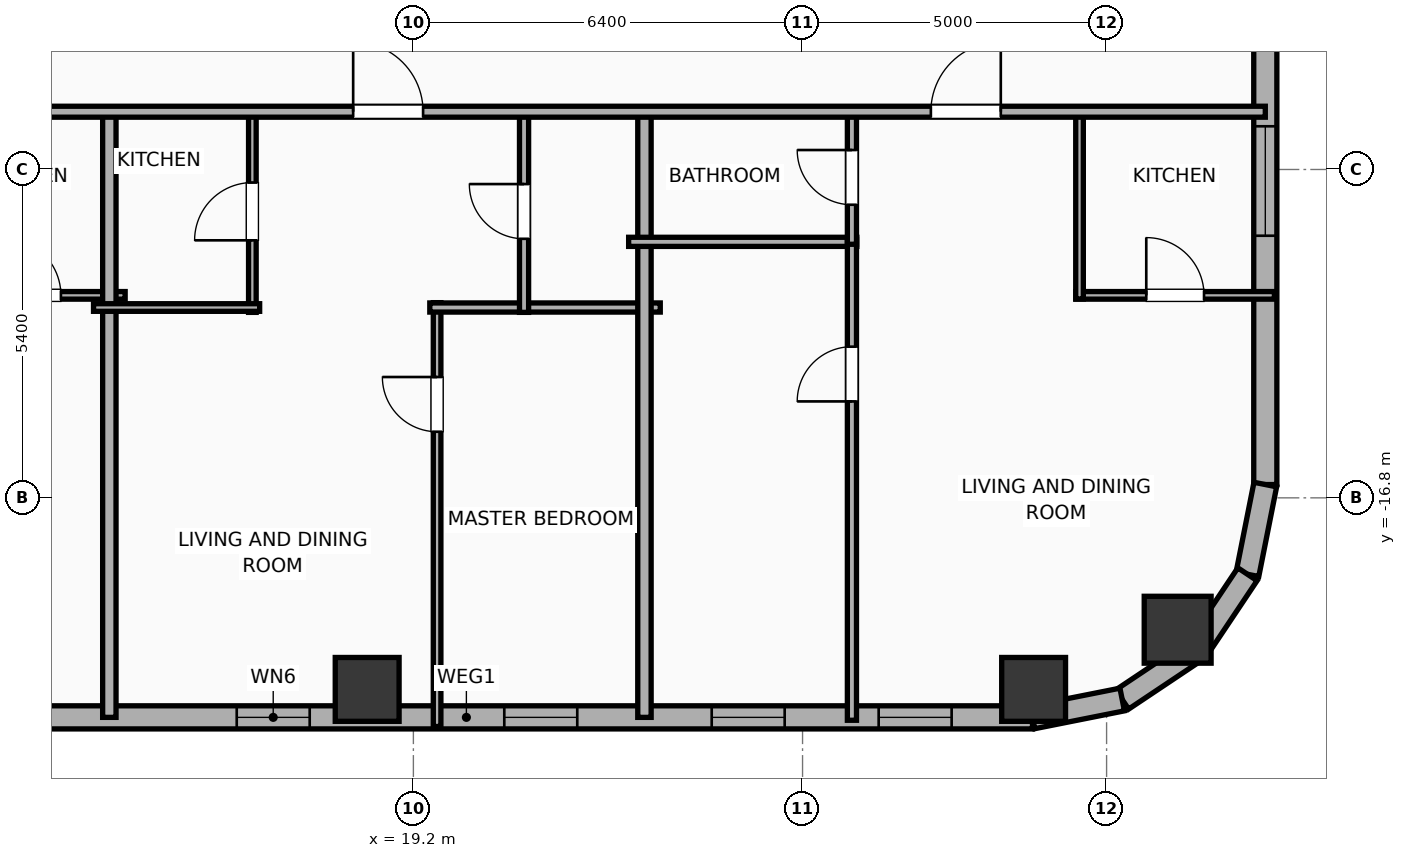
"""IFC4 building model, lengths in metres.
Left out: names, types, materials, properties, quantities, classifications, styles, units other than length and angle.
Written with IfcOpenShell. Run it as: python <this file> out.ifc"""

import sys

from ifc_helpers import new_model, si_unit, direction, frame, frame_2d, origin, origin_2d, place, context, subcontext, project, spatial, rectangle, hollow_rectangle, hollow_circle, extrude, element, fill, save


model = new_model("IFC4")
c1 = context("Model", 3, precision=1e-05, world=origin(), true_north=direction((0.0, 1.0)))
c2 = subcontext(c1, "Body", "Model", "MODEL_VIEW")
j1 = project(units=[si_unit("LENGTHUNIT", "METRE"), si_unit("PLANEANGLEUNIT", "RADIAN")], contexts=[c1])
p1 = place(None, origin())
s1 = spatial("IfcSite", under=j1, at=p1, CompositionType="ELEMENT")
p2 = place(p1, origin())
s2 = spatial("IfcBuilding", under=s1, at=p2, CompositionType="ELEMENT")
p3 = place(p2, frame((0.0, 0.0, 117.0)))
s3 = spatial("IfcBuildingStorey", under=s2, at=p3, CompositionType="ELEMENT", Elevation=117.0)
for number, where, z_axis, x_axis in (
    (1, (18.44, -19.95, 0.0), (0.0, 0.0, 1.0), (1.0, 0.0, 0.0)),
    (2, (29.4, -19.95, 0.0), (0.0, 0.0, 1.0), (1.0, 0.0, 0.0)),
):
    element("IfcColumn", number, at=place(p3, frame(where, z_axis=z_axis, x_axis=x_axis)), inside=s3, PredefinedType="COLUMN", context=c2, shape_type="SweptSolid", body=[
        extrude(hollow_rectangle(XDim=1.05, YDim=1.05, WallThickness=0.036, at=origin_2d()), origin(), (0.0, 0.0, 1.0), 3.9),
    ])
p4 = place(p3, frame((31.769, -18.969, 0.0), z_axis=(0.0, 0.0, 1.0), x_axis=(1.0, 0.0, 0.0)))
e3 = element("IfcColumn", 3, at=p4, inside=s3, PredefinedType="COLUMN", context=c2, shape_type="SweptSolid", body=[
    extrude(hollow_circle(Radius=0.55, WallThickness=0.036, at=origin_2d()), origin(), (0.0, 0.0, 1.0), 3.9),
])
p5 = place(p3, frame((29.381, -20.41, 0.0), z_axis=(0.0, 0.0, 1.0), x_axis=(-1.0, 0.0, 0.0)))
e4 = element("IfcWall", 4, at=p5, inside=s3, PredefinedType="ELEMENTEDWALL", context=c2, shape_type="SweptSolid", body=[
    extrude(rectangle(XDim=18.619, YDim=0.38, at=frame_2d((9.31, 0.0))), origin(), (0.0, 0.0, 1.0), 3.65),
])
p6 = place(p5, frame((11.886, 0.0, 0.75)))
e5 = element("IfcOpeningElement", 5, at=p6, cuts=e4, PredefinedType="OPENING", context=c2, shape_type="SweptSolid", body=[
    extrude(rectangle(XDim=1.2, YDim=2.05, at=frame_2d((0.6, 1.025))), frame((0.0, 0.2, 0.0), z_axis=(0.0, -1.0, 0.0), x_axis=(1.0, 0.0, 0.0)), (0.0, 0.0, 1.0), 0.4),
])
p7 = place(p5, frame((7.486, 0.0, 0.75)))
e6 = element("IfcOpeningElement", 6, at=p7, cuts=e4, PredefinedType="OPENING", context=c2, shape_type="SweptSolid", body=[
    extrude(rectangle(XDim=1.2, YDim=2.05, at=frame_2d((0.6, 1.025))), frame((0.0, 0.2, 0.0), z_axis=(0.0, -1.0, 0.0), x_axis=(1.0, 0.0, 0.0)), (0.0, 0.0, 1.0), 0.4),
])
p8 = place(p5, frame((4.075, 0.0, 0.75)))
e7 = element("IfcOpeningElement", 7, at=p8, cuts=e4, PredefinedType="OPENING", context=c2, shape_type="SweptSolid", body=[
    extrude(rectangle(XDim=1.2, YDim=2.05, at=frame_2d((0.6, 1.025))), frame((0.0, 0.2, 0.0), z_axis=(0.0, -1.0, 0.0), x_axis=(1.0, 0.0, 0.0)), (0.0, 0.0, 1.0), 0.4),
])
p9 = place(p5, frame((1.33, 0.0, 0.75)))
e8 = element("IfcOpeningElement", 8, at=p9, cuts=e4, PredefinedType="OPENING", context=c2, shape_type="SweptSolid", body=[
    extrude(rectangle(XDim=1.2, YDim=2.05, at=frame_2d((0.6, 1.025))), frame((0.0, 0.2, 0.0), z_axis=(0.0, -1.0, 0.0), x_axis=(1.0, 0.0, 0.0)), (0.0, 0.0, 1.0), 0.4),
])
p10 = place(p3, frame((33.21, -4.898, 0.0), z_axis=(0.0, 0.0, 1.0), x_axis=(0.0, -1.0, 0.0)))
e9 = element("IfcWall", 9, at=p10, inside=s3, PredefinedType="ELEMENTEDWALL", context=c2, shape_type="SweptSolid", body=[
    extrude(rectangle(XDim=11.683, YDim=0.38, at=frame_2d((5.842, 0.0))), origin(), (0.0, 0.0, 1.0), 3.65),
])
p11 = place(p10, frame((5.792, 0.0, 0.75)))
e10 = element("IfcOpeningElement", 10, at=p11, cuts=e9, PredefinedType="OPENING", context=c2, shape_type="SweptSolid", body=[
    extrude(rectangle(XDim=1.8, YDim=2.1, at=frame_2d((0.9, 1.05))), frame((0.0, 0.2, 0.0), z_axis=(0.0, -1.0, 0.0), x_axis=(1.0, 0.0, 0.0)), (0.0, 0.0, 1.0), 0.4),
])
p12 = place(p3, frame((33.21, -16.581, 0.0), z_axis=(0.0, 0.0, 1.0), x_axis=(-0.195086038585, -0.980786132421, 0.0)))
e11 = element("IfcWall", 11, at=p12, inside=s3, PredefinedType="ELEMENTEDWALL", context=c2, shape_type="SweptSolid", body=[
    extrude(rectangle(XDim=1.504, YDim=0.38, at=frame_2d((0.752, 0.0))), origin(), (0.0, 0.0, 1.0), 3.65),
])
p13 = place(p3, frame((32.917, -18.057, 0.0), z_axis=(0.0, 0.0, 1.0), x_axis=(-0.555610286119, -0.831442848281, 0.0)))
e12 = element("IfcWall", 12, at=p13, inside=s3, PredefinedType="ELEMENTEDWALL", context=c2, shape_type="SweptSolid", body=[
    extrude(rectangle(XDim=1.485, YDim=0.38, at=frame_2d((0.743, 0.0))), origin(), (0.0, 0.0, 1.0), 3.65),
])
p14 = place(p3, frame((32.091, -19.292, 0.0), z_axis=(0.0, 0.0, 1.0), x_axis=(-0.831468045563, -0.555572577804, 0.0)))
e13 = element("IfcWall", 13, at=p14, inside=s3, PredefinedType="ELEMENTEDWALL", context=c2, shape_type="SweptSolid", body=[
    extrude(rectangle(XDim=1.485, YDim=0.38, at=frame_2d((0.742, 0.0))), origin(), (0.0, 0.0, 1.0), 3.65),
])
p15 = place(p3, frame((30.857, -20.116, 0.0), z_axis=(0.0, 0.0, 1.0), x_axis=(-0.980786132421, -0.195086038585, 0.0)))
e14 = element("IfcWall", 14, at=p15, inside=s3, PredefinedType="ELEMENTEDWALL", context=c2, shape_type="SweptSolid", body=[
    extrude(rectangle(XDim=1.504, YDim=0.38, at=frame_2d((0.752, 0.0))), origin(), (0.0, 0.0, 1.0), 3.65),
])
p16 = place(p3, frame((11.397, -13.47, 0.0), z_axis=(0.0, 0.0, 1.0), x_axis=(1.0, 0.0, 0.0)))
e15 = element("IfcWall", 15, at=p16, inside=s3, PredefinedType="PARTITIONING", context=c2, shape_type="SweptSolid", body=[
    extrude(rectangle(XDim=3.063, YDim=0.125, at=frame_2d((1.531, 0.0))), origin(), (0.0, 0.0, 1.0), 3.65),
])
p17 = place(p16, frame((1.056, 0.0, 0.0)))
e16 = element("IfcOpeningElement", 16, at=p17, cuts=e15, PredefinedType="OPENING", context=c2, shape_type="SweptSolid", body=[
    extrude(rectangle(XDim=0.95, YDim=2.05, at=frame_2d((0.475, 1.025))), frame((0.0, 0.073, 0.0), z_axis=(0.0, -1.0, 0.0), x_axis=(1.0, 0.0, 0.0)), (0.0, 0.0, 1.0), 0.145),
])
p18 = place(p3, frame((14.2, -20.41, 0.0), z_axis=(0.0, 0.0, 1.0), x_axis=(0.0, 1.0, 0.0)))
e17 = element("IfcWall", 17, at=p18, inside=s3, PredefinedType="PARTITIONING", context=c2, shape_type="SweptSolid", body=[
    extrude(rectangle(XDim=10.04, YDim=0.22, at=frame_2d((5.02, 0.0))), origin(), (0.0, 0.0, 1.0), 3.65),
])
p19 = place(p3, frame((19.59, -20.56, 0.0), z_axis=(0.0, 0.0, 1.0), x_axis=(0.0, 1.0, 0.0)))
e18 = element("IfcWall", 18, at=p19, inside=s3, PredefinedType="PARTITIONING", context=c2, shape_type="SweptSolid", body=[
    extrude(rectangle(XDim=6.97, YDim=0.125, at=frame_2d((3.485, 0.0))), origin(), (0.0, 0.0, 1.0), 3.65),
])
p20 = place(p19, frame((4.847, 0.0, 0.0)))
e19 = element("IfcOpeningElement", 19, at=p20, cuts=e18, PredefinedType="OPENING", context=c2, shape_type="SweptSolid", body=[
    extrude(rectangle(XDim=0.9, YDim=2.05, at=frame_2d((0.45, 1.025))), frame((0.0, 0.073, 0.0), z_axis=(0.0, -1.0, 0.0), x_axis=(1.0, 0.0, 0.0)), (0.0, 0.0, 1.0), 0.145),
])
p21 = place(p3, frame((19.47, -13.67, 0.0), z_axis=(0.0, 0.0, 1.0), x_axis=(1.0, 0.0, 0.0)))
e20 = element("IfcWall", 20, at=p21, inside=s3, PredefinedType="PLUMBINGWALL", context=c2, shape_type="SweptSolid", body=[
    extrude(rectangle(XDim=3.79, YDim=0.15, at=frame_2d((1.895, 0.0))), origin(), (0.0, 0.0, 1.0), 3.65),
])
p22 = place(p3, frame((16.552, -13.75, 0.0), z_axis=(0.0, 0.0, 1.0), x_axis=(0.0, 1.0, 0.0)))
e21 = element("IfcWall", 21, at=p22, inside=s3, PredefinedType="PARTITIONING", context=c2, shape_type="SweptSolid", body=[
    extrude(rectangle(XDim=3.32, YDim=0.125, at=frame_2d((1.66, 0.0))), origin(), (0.0, 0.0, 1.0), 3.65),
])
p23 = place(p22, frame((1.185, 0.0, 0.0)))
e22 = element("IfcOpeningElement", 22, at=p23, cuts=e21, PredefinedType="OPENING", context=c2, shape_type="SweptSolid", body=[
    extrude(rectangle(XDim=0.95, YDim=2.05, at=frame_2d((0.475, 1.025))), frame((0.0, 0.073, 0.0), z_axis=(0.0, -1.0, 0.0), x_axis=(1.0, 0.0, 0.0)), (0.0, 0.0, 1.0), 0.145),
])
p24 = place(p3, frame((13.94, -13.67, 0.0), z_axis=(0.0, 0.0, 1.0), x_axis=(1.0, 0.0, 0.0)))
e23 = element("IfcWall", 23, at=p24, inside=s3, PredefinedType="PARTITIONING", context=c2, shape_type="SweptSolid", body=[
    extrude(rectangle(XDim=2.732, YDim=0.125, at=frame_2d((1.366, 0.0))), origin(), (0.0, 0.0, 1.0), 3.65),
])
p25 = place(p3, frame((21.02, -13.75, 0.0), z_axis=(0.0, 0.0, 1.0), x_axis=(0.0, 1.0, 0.0)))
e24 = element("IfcWall", 24, at=p25, inside=s3, PredefinedType="PLUMBINGWALL", context=c2, shape_type="SweptSolid", body=[
    extrude(rectangle(XDim=3.32, YDim=0.15, at=frame_2d((1.66, 0.0))), origin(), (0.0, 0.0, 1.0), 3.65),
])
p26 = place(p25, frame((1.21, 0.0, 0.0)))
e25 = element("IfcOpeningElement", 25, at=p26, cuts=e24, PredefinedType="OPENING", context=c2, shape_type="SweptSolid", body=[
    extrude(rectangle(XDim=0.9, YDim=2.05, at=frame_2d((0.45, 1.025))), frame((0.0, 0.085, 0.0), z_axis=(0.0, -1.0, 0.0), x_axis=(1.0, 0.0, 0.0)), (0.0, 0.0, 1.0), 0.17),
])
p27 = place(p3, frame((23.0, -20.41, 0.0), z_axis=(0.0, 0.0, 1.0), x_axis=(0.0, 1.0, 0.0)))
e26 = element("IfcWall", 26, at=p27, inside=s3, PredefinedType="PARTITIONING", context=c2, shape_type="SweptSolid", body=[
    extrude(rectangle(XDim=10.04, YDim=0.22, at=frame_2d((5.02, 0.0))), origin(), (0.0, 0.0, 1.0), 3.65),
])
p28 = place(p3, frame((22.74, -12.59, 0.0), z_axis=(0.0, 0.0, 1.0), x_axis=(1.0, 0.0, 0.0)))
e27 = element("IfcWall", 27, at=p28, inside=s3, PredefinedType="PLUMBINGWALL", context=c2, shape_type="SweptSolid", body=[
    extrude(rectangle(XDim=3.752, YDim=0.15, at=frame_2d((1.876, 0.0))), origin(), (0.0, 0.0, 1.0), 3.65),
])
p29 = place(p3, frame((26.412, -20.458, 0.0), z_axis=(0.0, 0.0, 1.0), x_axis=(0.0, 1.0, 0.0)))
e28 = element("IfcWall", 28, at=p29, inside=s3, PredefinedType="PLUMBINGWALL", context=c2, shape_type="SweptSolid", body=[
    extrude(rectangle(XDim=7.907, YDim=0.15, at=frame_2d((3.954, 0.0))), origin(), (0.0, 0.0, 1.0), 3.65),
])
p30 = place(p29, frame((5.243, 0.0, 0.0)))
e29 = element("IfcOpeningElement", 29, at=p30, cuts=e28, PredefinedType="OPENING", context=c2, shape_type="SweptSolid", body=[
    extrude(rectangle(XDim=0.9, YDim=2.05, at=frame_2d((0.45, 1.025))), frame((0.0, 0.085, 0.0), z_axis=(0.0, -1.0, 0.0), x_axis=(1.0, 0.0, 0.0)), (0.0, 0.0, 1.0), 0.17),
])
p31 = place(p3, frame((26.412, -12.63, 0.0), z_axis=(0.0, 0.0, 1.0), x_axis=(0.0, 1.0, 0.0)))
e30 = element("IfcWall", 30, at=p31, inside=s3, PredefinedType="PLUMBINGWALL", context=c2, shape_type="SweptSolid", body=[
    extrude(rectangle(XDim=2.2, YDim=0.15, at=frame_2d((1.1, 0.0))), origin(), (0.0, 0.0, 1.0), 3.65),
])
p32 = place(p31, frame((0.65, 0.0, 0.0)))
e31 = element("IfcOpeningElement", 31, at=p32, cuts=e30, PredefinedType="OPENING", context=c2, shape_type="SweptSolid", body=[
    extrude(rectangle(XDim=0.9, YDim=2.05, at=frame_2d((0.45, 1.025))), frame((0.0, 0.085, 0.0), z_axis=(0.0, -1.0, 0.0), x_axis=(1.0, 0.0, 0.0)), (0.0, 0.0, 1.0), 0.17),
])
p33 = place(p3, frame((30.095, -13.47, 0.0), z_axis=(0.0, 0.0, 1.0), x_axis=(1.0, 0.0, 0.0)))
e32 = element("IfcWall", 32, at=p33, inside=s3, PredefinedType="PARTITIONING", context=c2, shape_type="SweptSolid", body=[
    extrude(rectangle(XDim=3.265, YDim=0.125, at=frame_2d((1.633, 0.0))), origin(), (0.0, 0.0, 1.0), 3.65),
])
p34 = place(p33, frame((1.157, 0.0, 0.0)))
e33 = element("IfcOpeningElement", 33, at=p34, cuts=e32, PredefinedType="OPENING", context=c2, shape_type="SweptSolid", body=[
    extrude(rectangle(XDim=0.95, YDim=2.05, at=frame_2d((0.475, 1.025))), frame((0.0, 0.073, 0.0), z_axis=(0.0, -1.0, 0.0), x_axis=(1.0, 0.0, 0.0)), (0.0, 0.0, 1.0), 0.145),
])
p35 = place(p3, frame((30.155, -13.53, 0.0), z_axis=(0.0, 0.0, 1.0), x_axis=(0.0, 1.0, 0.0)))
e34 = element("IfcWall", 34, at=p35, inside=s3, PredefinedType="PARTITIONING", context=c2, shape_type="SweptSolid", body=[
    extrude(rectangle(XDim=3.1, YDim=0.125, at=frame_2d((1.55, 0.0))), origin(), (0.0, 0.0, 1.0), 3.65),
])
p36 = place(p3, frame((-29.21, -10.45, 0.0), z_axis=(0.0, 0.0, 1.0), x_axis=(1.0, 0.0, 0.0)))
e35 = element("IfcWall", 35, at=p36, inside=s3, PredefinedType="PARTITIONING", context=c2, shape_type="SweptSolid", body=[
    extrude(rectangle(XDim=62.42, YDim=0.18, at=frame_2d((31.21, 0.0))), origin(), (0.0, 0.0, 1.0), 3.65),
])
p37 = place(p36, frame((3.813, 0.0, 0.0)))
e36 = element("IfcOpeningElement", 36, at=p37, cuts=e35, PredefinedType="OPENING", context=c2, shape_type="SweptSolid", body=[
    extrude(rectangle(XDim=1.15, YDim=2.05, at=frame_2d((0.575, 1.025))), frame((0.0, 0.1, 0.0), z_axis=(0.0, -1.0, 0.0), x_axis=(1.0, 0.0, 0.0)), (0.0, 0.0, 1.0), 0.2),
])
p38 = place(p36, frame((12.271, 0.0, 0.0)))
e37 = element("IfcOpeningElement", 37, at=p38, cuts=e35, PredefinedType="OPENING", context=c2, shape_type="SweptSolid", body=[
    extrude(rectangle(XDim=1.15, YDim=2.05, at=frame_2d((0.575, 1.025))), frame((0.0, 0.1, 0.0), z_axis=(0.0, -1.0, 0.0), x_axis=(1.0, 0.0, 0.0)), (0.0, 0.0, 1.0), 0.2),
])
p39 = place(p36, frame((20.804, 0.0, 0.0)))
e38 = element("IfcOpeningElement", 38, at=p39, cuts=e35, PredefinedType="OPENING", context=c2, shape_type="SweptSolid", body=[
    extrude(rectangle(XDim=1.15, YDim=2.05, at=frame_2d((0.575, 1.025))), frame((0.0, 0.1, 0.0), z_axis=(0.0, -1.0, 0.0), x_axis=(1.0, 0.0, 0.0)), (0.0, 0.0, 1.0), 0.2),
])
p40 = place(p36, frame((29.848, 0.0, 0.0)))
e39 = element("IfcOpeningElement", 39, at=p40, cuts=e35, PredefinedType="OPENING", context=c2, shape_type="SweptSolid", body=[
    extrude(rectangle(XDim=1.15, YDim=2.05, at=frame_2d((0.575, 1.025))), frame((0.0, 0.1, 0.0), z_axis=(0.0, -1.0, 0.0), x_axis=(1.0, 0.0, 0.0)), (0.0, 0.0, 1.0), 0.2),
])
p41 = place(p36, frame((38.45, 0.0, 0.0)))
e40 = element("IfcOpeningElement", 40, at=p41, cuts=e35, PredefinedType="OPENING", context=c2, shape_type="SweptSolid", body=[
    extrude(rectangle(XDim=1.15, YDim=2.05, at=frame_2d((0.575, 1.025))), frame((0.0, 0.1, 0.0), z_axis=(0.0, -1.0, 0.0), x_axis=(1.0, 0.0, 0.0)), (0.0, 0.0, 1.0), 0.2),
])
p42 = place(p36, frame((47.42, 0.0, 0.0)))
e41 = element("IfcOpeningElement", 41, at=p42, cuts=e35, PredefinedType="OPENING", context=c2, shape_type="SweptSolid", body=[
    extrude(rectangle(XDim=1.15, YDim=2.05, at=frame_2d((0.575, 1.025))), frame((0.0, 0.1, 0.0), z_axis=(0.0, -1.0, 0.0), x_axis=(1.0, 0.0, 0.0)), (0.0, 0.0, 1.0), 0.2),
])
p43 = place(p36, frame((56.92, 0.0, 0.0)))
e42 = element("IfcOpeningElement", 42, at=p43, cuts=e35, PredefinedType="OPENING", context=c2, shape_type="SweptSolid", body=[
    extrude(rectangle(XDim=1.15, YDim=2.05, at=frame_2d((0.575, 1.025))), frame((0.0, 0.1, 0.0), z_axis=(0.0, -1.0, 0.0), x_axis=(1.0, 0.0, 0.0)), (0.0, 0.0, 1.0), 0.2),
])
p44 = place(p11, origin())
e43 = element("IfcWindow", 43, at=p44, inside=s3, PartitioningType="SINGLE_PANEL", PredefinedType="WINDOW", context=c2, shape_type="SweptSolid", body=[
    extrude(rectangle(XDim=1.8, YDim=2.1, at=frame_2d((0.9, 1.05))), frame((0.0, 0.03, 0.0), z_axis=(0.0, -1.0, 0.0), x_axis=(1.0, 0.0, 0.0)), (0.0, 0.0, 1.0), 0.06),
])
fill(e10, e43)
p45 = place(p6, origin())
e44 = element("IfcWindow", 44, at=p45, inside=s3, PartitioningType="SINGLE_PANEL", PredefinedType="WINDOW", context=c2, shape_type="SweptSolid", body=[
    extrude(rectangle(XDim=1.2, YDim=2.05, at=frame_2d((0.6, 1.025))), frame((0.0, 0.03, 0.0), z_axis=(0.0, -1.0, 0.0), x_axis=(1.0, 0.0, 0.0)), (0.0, 0.0, 1.0), 0.06),
])
fill(e5, e44)
p46 = place(p7, origin())
e45 = element("IfcWindow", 45, at=p46, inside=s3, PartitioningType="SINGLE_PANEL", PredefinedType="WINDOW", context=c2, shape_type="SweptSolid", body=[
    extrude(rectangle(XDim=1.2, YDim=2.05, at=frame_2d((0.6, 1.025))), frame((0.0, 0.03, 0.0), z_axis=(0.0, -1.0, 0.0), x_axis=(1.0, 0.0, 0.0)), (0.0, 0.0, 1.0), 0.06),
])
fill(e6, e45)
p47 = place(p8, origin())
e46 = element("IfcWindow", 46, at=p47, inside=s3, PartitioningType="SINGLE_PANEL", PredefinedType="WINDOW", context=c2, shape_type="SweptSolid", body=[
    extrude(rectangle(XDim=1.2, YDim=2.05, at=frame_2d((0.6, 1.025))), frame((0.0, 0.03, 0.0), z_axis=(0.0, -1.0, 0.0), x_axis=(1.0, 0.0, 0.0)), (0.0, 0.0, 1.0), 0.06),
])
fill(e7, e46)
p48 = place(p9, origin())
e47 = element("IfcWindow", 47, at=p48, inside=s3, PartitioningType="SINGLE_PANEL", PredefinedType="WINDOW", context=c2, shape_type="SweptSolid", body=[
    extrude(rectangle(XDim=1.2, YDim=2.05, at=frame_2d((0.6, 1.025))), frame((0.0, 0.03, 0.0), z_axis=(0.0, -1.0, 0.0), x_axis=(1.0, 0.0, 0.0)), (0.0, 0.0, 1.0), 0.06),
])
fill(e8, e47)
p49 = place(p17, origin())
e48 = element("IfcDoor", 48, at=p49, inside=s3, OperationType="SINGLE_SWING_LEFT", PredefinedType="DOOR", context=c2, shape_type="SweptSolid", body=[
    extrude(rectangle(XDim=0.95, YDim=2.05, at=frame_2d((0.475, 1.025))), frame((0.0, 0.025, 0.0), z_axis=(0.0, -1.0, 0.0), x_axis=(1.0, 0.0, 0.0)), (0.0, 0.0, 1.0), 0.05),
])
fill(e16, e48)
p50 = place(p20, origin())
e49 = element("IfcDoor", 49, at=p50, inside=s3, OperationType="SINGLE_SWING_RIGHT", PredefinedType="DOOR", context=c2, shape_type="SweptSolid", body=[
    extrude(rectangle(XDim=0.9, YDim=2.05, at=frame_2d((0.45, 1.025))), frame((0.0, 0.025, 0.0), z_axis=(0.0, -1.0, 0.0), x_axis=(1.0, 0.0, 0.0)), (0.0, 0.0, 1.0), 0.05),
])
fill(e19, e49)
p51 = place(p23, origin())
e50 = element("IfcDoor", 50, at=p51, inside=s3, OperationType="SINGLE_SWING_LEFT", PredefinedType="DOOR", context=c2, shape_type="SweptSolid", body=[
    extrude(rectangle(XDim=0.95, YDim=2.05, at=frame_2d((0.475, 1.025))), frame((0.0, 0.025, 0.0), z_axis=(0.0, -1.0, 0.0), x_axis=(1.0, 0.0, 0.0)), (0.0, 0.0, 1.0), 0.05),
])
fill(e22, e50)
p52 = place(p26, origin())
e51 = element("IfcDoor", 51, at=p52, inside=s3, OperationType="SINGLE_SWING_RIGHT", PredefinedType="DOOR", context=c2, shape_type="SweptSolid", body=[
    extrude(rectangle(XDim=0.9, YDim=2.05, at=frame_2d((0.45, 1.025))), frame((0.0, 0.025, 0.0), z_axis=(0.0, -1.0, 0.0), x_axis=(1.0, 0.0, 0.0)), (0.0, 0.0, 1.0), 0.05),
])
fill(e25, e51)
p53 = place(p30, origin())
e52 = element("IfcDoor", 52, at=p53, inside=s3, OperationType="SINGLE_SWING_LEFT", PredefinedType="DOOR", context=c2, shape_type="SweptSolid", body=[
    extrude(rectangle(XDim=0.9, YDim=2.05, at=frame_2d((0.45, 1.025))), frame((0.0, 0.025, 0.0), z_axis=(0.0, -1.0, 0.0), x_axis=(1.0, 0.0, 0.0)), (0.0, 0.0, 1.0), 0.05),
])
fill(e29, e52)
p54 = place(p32, origin())
e53 = element("IfcDoor", 53, at=p54, inside=s3, OperationType="SINGLE_SWING_RIGHT", PredefinedType="DOOR", context=c2, shape_type="SweptSolid", body=[
    extrude(rectangle(XDim=0.9, YDim=2.05, at=frame_2d((0.45, 1.025))), frame((0.0, 0.025, 0.0), z_axis=(0.0, -1.0, 0.0), x_axis=(1.0, 0.0, 0.0)), (0.0, 0.0, 1.0), 0.05),
])
fill(e31, e53)
p55 = place(p34, origin())
e54 = element("IfcDoor", 54, at=p55, inside=s3, OperationType="SINGLE_SWING_LEFT", PredefinedType="DOOR", context=c2, shape_type="SweptSolid", body=[
    extrude(rectangle(XDim=0.95, YDim=2.05, at=frame_2d((0.475, 1.025))), frame((0.0, 0.025, 0.0), z_axis=(0.0, -1.0, 0.0), x_axis=(1.0, 0.0, 0.0)), (0.0, 0.0, 1.0), 0.05),
])
fill(e33, e54)
p56 = place(p42, origin())
e55 = element("IfcDoor", 55, at=p56, inside=s3, OperationType="SINGLE_SWING_LEFT", PredefinedType="DOOR", context=c2, shape_type="SweptSolid", body=[
    extrude(rectangle(XDim=1.15, YDim=2.05, at=frame_2d((0.575, 1.025))), frame((0.0, 0.025, 0.0), z_axis=(0.0, -1.0, 0.0), x_axis=(1.0, 0.0, 0.0)), (0.0, 0.0, 1.0), 0.05),
])
fill(e41, e55)
p57 = place(p43, origin())
e56 = element("IfcDoor", 56, at=p57, inside=s3, OperationType="SINGLE_SWING_RIGHT", PredefinedType="DOOR", context=c2, shape_type="SweptSolid", body=[
    extrude(rectangle(XDim=1.15, YDim=2.05, at=frame_2d((0.575, 1.025))), frame((0.0, 0.025, 0.0), z_axis=(0.0, -1.0, 0.0), x_axis=(1.0, 0.0, 0.0)), (0.0, 0.0, 1.0), 0.05),
])
fill(e42, e56)
save(model, sys.argv[1])
